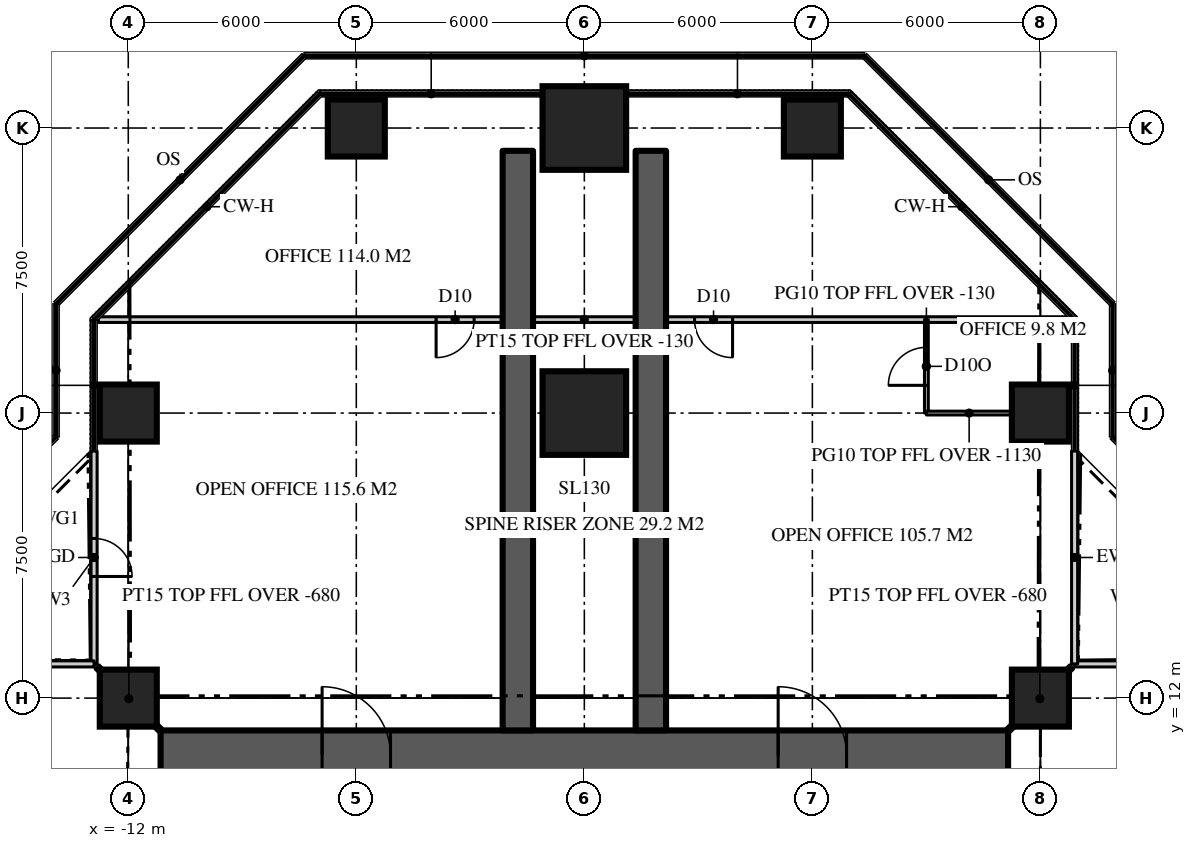
"""IFC4 building model, lengths in metres.
Left out: names, types, materials, properties, quantities, classifications, styles, units other than length and angle.
Written with IfcOpenShell. Run it as: python <this file> out.ifc"""

import sys

from ifc_helpers import new_model, si_unit, direction, frame, frame_2d, origin, origin_2d, place, context, subcontext, project, spatial, rectangle, extrude, element, fill, save


model = new_model("IFC4")
c1 = context("Model", 3, precision=1e-05, world=origin(), true_north=direction((0.0, 1.0)))
c2 = subcontext(c1, "Body", "Model", "MODEL_VIEW")
j1 = project(units=[si_unit("LENGTHUNIT", "METRE"), si_unit("PLANEANGLEUNIT", "RADIAN")], contexts=[c1])
p1 = place(None, origin())
s1 = spatial("IfcSite", under=j1, at=p1, CompositionType="ELEMENT")
p2 = place(p1, origin())
s2 = spatial("IfcBuilding", under=s1, at=p2, CompositionType="ELEMENT")
p3 = place(p2, frame((0.0, 0.0, 220.5)))
s3 = spatial("IfcBuildingStorey", under=s2, at=p3, CompositionType="ELEMENT", Elevation=220.5)
p4 = place(p3, frame((-11.15, 10.5, 0.0), z_axis=(0.0, 0.0, 1.0), x_axis=(1.0, 0.0, 0.0)))
e1 = element("IfcWall", 1, at=p4, inside=s3, PredefinedType="SHEAR", context=c2, shape_type="SweptSolid", body=[
    extrude(rectangle(XDim=22.3, YDim=1.3, at=frame_2d((11.15, 0.0))), origin(), (0.0, 0.0, 1.0), 3.9),
])
p5 = place(p4, frame((4.25, 0.0, 0.0)))
e2 = element("IfcOpeningElement", 2, at=p5, cuts=e1, PredefinedType="OPENING", context=c2, shape_type="SweptSolid", body=[
    extrude(rectangle(XDim=1.8, YDim=2.2, at=frame_2d((0.9, 1.1))), frame((0.0, 0.66, 0.0), z_axis=(0.0, -1.0, 0.0), x_axis=(1.0, 0.0, 0.0)), (0.0, 0.0, 1.0), 1.32),
])
p6 = place(p4, frame((16.25, 0.0, 0.0)))
e3 = element("IfcOpeningElement", 3, at=p6, cuts=e1, PredefinedType="OPENING", context=c2, shape_type="SweptSolid", body=[
    extrude(rectangle(XDim=1.8, YDim=2.2, at=frame_2d((0.9, 1.1))), frame((0.0, 0.66, 0.0), z_axis=(0.0, -1.0, 0.0), x_axis=(1.0, 0.0, 0.0)), (0.0, 0.0, 1.0), 1.32),
])
for number, where, z_axis, x_axis in (
    (4, (1.75, 11.15, 0.0), (0.0, 0.0, 1.0), (0.0, 1.0, 0.0)),
    (5, (-1.75, 11.15, 0.0), (0.0, 0.0, 1.0), (0.0, 1.0, 0.0)),
):
    element("IfcWall", number, at=place(p3, frame(where, z_axis=z_axis, x_axis=x_axis)), inside=s3, PredefinedType="SHEAR", context=c2, shape_type="SweptSolid", body=[
        extrude(rectangle(XDim=15.25, YDim=0.8, at=frame_2d((7.625, 0.0))), origin(), (0.0, 0.0, 1.0), 3.9),
    ])
for number, where, z_axis, x_axis in (
    (6, (-12.0, 12.0, 0.0), (0.0, 0.0, 1.0), (1.0, 0.0, 0.0)),
    (7, (12.0, 12.0, 0.0), (0.0, 0.0, 1.0), (1.0, 0.0, 0.0)),
    (8, (-12.0, 19.5, 0.0), (0.0, 0.0, 1.0), (1.0, 0.0, 0.0)),
):
    element("IfcColumn", number, at=place(p3, frame(where, z_axis=z_axis, x_axis=x_axis)), inside=s3, PredefinedType="COLUMN", context=c2, shape_type="SweptSolid", body=[
        extrude(rectangle(XDim=1.5, YDim=1.5, at=origin_2d()), origin(), (0.0, 0.0, 1.0), 3.9),
    ])
p7 = place(p3, frame((0.0, 19.5, 0.0), z_axis=(0.0, 0.0, 1.0), x_axis=(1.0, 0.0, 0.0)))
e9 = element("IfcColumn", 9, at=p7, inside=s3, PredefinedType="COLUMN", context=c2, shape_type="SweptSolid", body=[
    extrude(rectangle(XDim=2.2, YDim=2.2, at=origin_2d()), origin(), (0.0, 0.0, 1.0), 3.9),
])
for number, where, z_axis, x_axis in (
    (10, (12.0, 19.5, 0.0), (0.0, 0.0, 1.0), (1.0, 0.0, 0.0)),
    (11, (-6.0, 27.0, 0.0), (0.0, 0.0, 1.0), (1.0, 0.0, 0.0)),
):
    element("IfcColumn", number, at=place(p3, frame(where, z_axis=z_axis, x_axis=x_axis)), inside=s3, PredefinedType="COLUMN", context=c2, shape_type="SweptSolid", body=[
        extrude(rectangle(XDim=1.5, YDim=1.5, at=origin_2d()), origin(), (0.0, 0.0, 1.0), 3.9),
    ])
p8 = place(p3, frame((0.0, 27.0, 0.0), z_axis=(0.0, 0.0, 1.0), x_axis=(1.0, 0.0, 0.0)))
e12 = element("IfcColumn", 12, at=p8, inside=s3, PredefinedType="COLUMN", context=c2, shape_type="SweptSolid", body=[
    extrude(rectangle(XDim=2.2, YDim=2.2, at=origin_2d()), origin(), (0.0, 0.0, 1.0), 3.9),
])
p9 = place(p3, frame((6.0, 27.0, 0.0), z_axis=(0.0, 0.0, 1.0), x_axis=(1.0, 0.0, 0.0)))
e13 = element("IfcColumn", 13, at=p9, inside=s3, PredefinedType="COLUMN", context=c2, shape_type="SweptSolid", body=[
    extrude(rectangle(XDim=1.5, YDim=1.5, at=origin_2d()), origin(), (0.0, 0.0, 1.0), 3.9),
])
p10 = place(p3, frame((18.5, 12.9, 0.0), z_axis=(0.0, 0.0, 1.0), x_axis=(-1.0, 0.0, 0.0)))
e14 = element("IfcWall", 14, at=p10, inside=s3, PredefinedType="SOLIDWALL", context=c2, shape_type="SweptSolid", body=[
    extrude(rectangle(XDim=5.6, YDim=0.16, at=frame_2d((2.8, 0.0))), origin(), (0.0, 0.0, 1.0), 3.77),
])
p11 = place(p10, frame((2.3, 0.0, 0.0)))
e15 = element("IfcOpeningElement", 15, at=p11, cuts=e14, PredefinedType="OPENING", context=c2, shape_type="SweptSolid", body=[
    extrude(rectangle(XDim=1.0, YDim=2.2, at=frame_2d((0.5, 1.1))), frame((0.0, 0.09, 0.0), z_axis=(0.0, -1.0, 0.0), x_axis=(1.0, 0.0, 0.0)), (0.0, 0.0, 1.0), 0.18),
])
p12 = place(p3, frame((12.9, 12.9, 0.0), z_axis=(0.0, 0.0, 1.0), x_axis=(0.0, 1.0, 0.0)))
e16 = element("IfcWall", 16, at=p12, inside=s3, PredefinedType="SOLIDWALL", context=c2, shape_type="SweptSolid", body=[
    extrude(rectangle(XDim=5.6, YDim=0.16, at=frame_2d((2.8, 0.0))), origin(), (0.0, 0.0, 1.0), 3.77),
])
p13 = place(p3, frame((-12.9, 18.5, 0.0), z_axis=(0.0, 0.0, 1.0), x_axis=(0.0, -1.0, 0.0)))
e17 = element("IfcWall", 17, at=p13, inside=s3, PredefinedType="SOLIDWALL", context=c2, shape_type="SweptSolid", body=[
    extrude(rectangle(XDim=5.6, YDim=0.16, at=frame_2d((2.8, 0.0))), origin(), (0.0, 0.0, 1.0), 3.77),
])
p14 = place(p13, frame((2.3, 0.0, 0.0)))
e18 = element("IfcOpeningElement", 18, at=p14, cuts=e17, PredefinedType="OPENING", context=c2, shape_type="SweptSolid", body=[
    extrude(rectangle(XDim=1.0, YDim=2.2, at=frame_2d((0.5, 1.1))), frame((0.0, 0.09, 0.0), z_axis=(0.0, -1.0, 0.0), x_axis=(1.0, 0.0, 0.0)), (0.0, 0.0, 1.0), 0.18),
])
p15 = place(p3, frame((-12.9, 12.9, 0.0), z_axis=(0.0, 0.0, 1.0), x_axis=(-1.0, 0.0, 0.0)))
e19 = element("IfcWall", 19, at=p15, inside=s3, PredefinedType="SOLIDWALL", context=c2, shape_type="SweptSolid", body=[
    extrude(rectangle(XDim=5.6, YDim=0.16, at=frame_2d((2.8, 0.0))), origin(), (0.0, 0.0, 1.0), 3.77),
])
p16 = place(p3, frame((12.786, 21.959, 0.0), z_axis=(0.0, 0.0, 1.0), x_axis=(-1.0, 0.0, 0.0)))
e20 = element("IfcWall", 20, at=p16, inside=s3, PredefinedType="PARTITIONING", context=c2, shape_type="SweptSolid", body=[
    extrude(rectangle(XDim=25.573, YDim=0.15, at=frame_2d((12.786, 0.0))), origin(), (0.0, 0.0, 1.0), 3.77),
])
p17 = place(p16, frame((15.687, 0.0, 0.0)))
e21 = element("IfcOpeningElement", 21, at=p17, cuts=e20, PredefinedType="OPENING", context=c2, shape_type="SweptSolid", body=[
    extrude(rectangle(XDim=1.0, YDim=2.2, at=frame_2d((0.5, 1.1))), frame((0.0, 0.085, 0.0), z_axis=(0.0, -1.0, 0.0), x_axis=(1.0, 0.0, 0.0)), (0.0, 0.0, 1.0), 0.17),
])
p18 = place(p16, frame((8.886, 0.0, 0.0)))
e22 = element("IfcOpeningElement", 22, at=p18, cuts=e20, PredefinedType="OPENING", context=c2, shape_type="SweptSolid", body=[
    extrude(rectangle(XDim=1.0, YDim=2.2, at=frame_2d((0.5, 1.1))), frame((0.0, 0.085, 0.0), z_axis=(0.0, -1.0, 0.0), x_axis=(1.0, 0.0, 0.0)), (0.0, 0.0, 1.0), 0.17),
])
p19 = place(p3, frame((9.0, 19.5, 0.0), z_axis=(0.0, 0.0, 1.0), x_axis=(0.0, 1.0, 0.0)))
e23 = element("IfcWall", 23, at=p19, inside=s3, PredefinedType="PARTITIONING", context=c2, shape_type="SweptSolid", body=[
    extrude(rectangle(XDim=2.459, YDim=0.1, at=frame_2d((1.229, 0.0))), origin(), (0.0, 0.0, 1.0), 3.77),
])
p20 = place(p19, frame((0.729, 0.0, 0.0)))
e24 = element("IfcOpeningElement", 24, at=p20, cuts=e23, PredefinedType="OPENING", context=c2, shape_type="SweptSolid", body=[
    extrude(rectangle(XDim=1.0, YDim=2.2, at=frame_2d((0.5, 1.1))), frame((0.0, 0.06, 0.0), z_axis=(0.0, -1.0, 0.0), x_axis=(1.0, 0.0, 0.0)), (0.0, 0.0, 1.0), 0.12),
])
p21 = place(p3, frame((9.0, 19.5, 0.0), z_axis=(0.0, 0.0, 1.0), x_axis=(1.0, 0.0, 0.0)))
e25 = element("IfcWall", 25, at=p21, inside=s3, PredefinedType="PARTITIONING", context=c2, shape_type="SweptSolid", body=[
    extrude(rectangle(XDim=2.25, YDim=0.1, at=frame_2d((1.125, 0.0))), origin(), (0.0, 0.0, 1.0), 2.77),
])
for number, where, z_axis, x_axis in (
    (26, (11.15, 11.15, 0.0), (0.0, 0.0, 1.0), (0.707, 0.707, 0.0)),
    (27, (-11.15, 11.15, 0.0), (0.0, 0.0, 1.0), (-0.707, 0.707, 0.0)),
):
    element("IfcWall", number, at=place(p3, frame(where, z_axis=z_axis, x_axis=x_axis)), inside=s3, PredefinedType="PARTITIONING", context=c2, shape_type="SweptSolid", body=[
        extrude(rectangle(XDim=2.362, YDim=0.15, at=frame_2d((1.181, 0.0))), origin(), (0.0, 0.0, 1.0), 3.22),
    ])
p22 = place(p14, origin())
e28 = element("IfcDoor", 28, at=p22, inside=s3, OperationType="SINGLE_SWING_RIGHT", PredefinedType="DOOR", context=c2, shape_type="SweptSolid", body=[
    extrude(rectangle(XDim=1.0, YDim=2.2, at=frame_2d((0.5, 1.1))), frame((0.0, 0.025, 0.0), z_axis=(0.0, -1.0, 0.0), x_axis=(1.0, 0.0, 0.0)), (0.0, 0.0, 1.0), 0.05),
])
fill(e18, e28)
p23 = place(p5, origin())
e29 = element("IfcDoor", 29, at=p23, inside=s3, OperationType="DOUBLE_DOOR_DOUBLE_SWING", PredefinedType="DOOR", context=c2, shape_type="SweptSolid", body=[
    extrude(rectangle(XDim=1.8, YDim=2.2, at=frame_2d((0.9, 1.1))), frame((0.0, 0.025, 0.0), z_axis=(0.0, -1.0, 0.0), x_axis=(1.0, 0.0, 0.0)), (0.0, 0.0, 1.0), 0.05),
])
fill(e2, e29)
p24 = place(p6, origin())
e30 = element("IfcDoor", 30, at=p24, inside=s3, OperationType="DOUBLE_DOOR_DOUBLE_SWING", PredefinedType="DOOR", context=c2, shape_type="SweptSolid", body=[
    extrude(rectangle(XDim=1.8, YDim=2.2, at=frame_2d((0.9, 1.1))), frame((0.0, 0.025, 0.0), z_axis=(0.0, -1.0, 0.0), x_axis=(1.0, 0.0, 0.0)), (0.0, 0.0, 1.0), 0.05),
])
fill(e3, e30)
p25 = place(p17, origin())
e31 = element("IfcDoor", 31, at=p25, inside=s3, OperationType="SINGLE_SWING_RIGHT", PredefinedType="DOOR", context=c2, shape_type="SweptSolid", body=[
    extrude(rectangle(XDim=1.0, YDim=2.2, at=frame_2d((0.5, 1.1))), frame((0.0, 0.025, 0.0), z_axis=(0.0, -1.0, 0.0), x_axis=(1.0, 0.0, 0.0)), (0.0, 0.0, 1.0), 0.05),
])
fill(e21, e31)
p26 = place(p18, origin())
e32 = element("IfcDoor", 32, at=p26, inside=s3, OperationType="SINGLE_SWING_LEFT", PredefinedType="DOOR", context=c2, shape_type="SweptSolid", body=[
    extrude(rectangle(XDim=1.0, YDim=2.2, at=frame_2d((0.5, 1.1))), frame((0.0, 0.025, 0.0), z_axis=(0.0, -1.0, 0.0), x_axis=(1.0, 0.0, 0.0)), (0.0, 0.0, 1.0), 0.05),
])
fill(e22, e32)
p27 = place(p20, origin())
e33 = element("IfcDoor", 33, at=p27, inside=s3, OperationType="SINGLE_SWING_LEFT", PredefinedType="DOOR", context=c2, shape_type="SweptSolid", body=[
    extrude(rectangle(XDim=1.0, YDim=2.2, at=frame_2d((0.5, 1.1))), frame((0.0, 0.025, 0.0), z_axis=(0.0, -1.0, 0.0), x_axis=(1.0, 0.0, 0.0)), (0.0, 0.0, 1.0), 0.05),
])
fill(e24, e33)
save(model, sys.argv[1])
